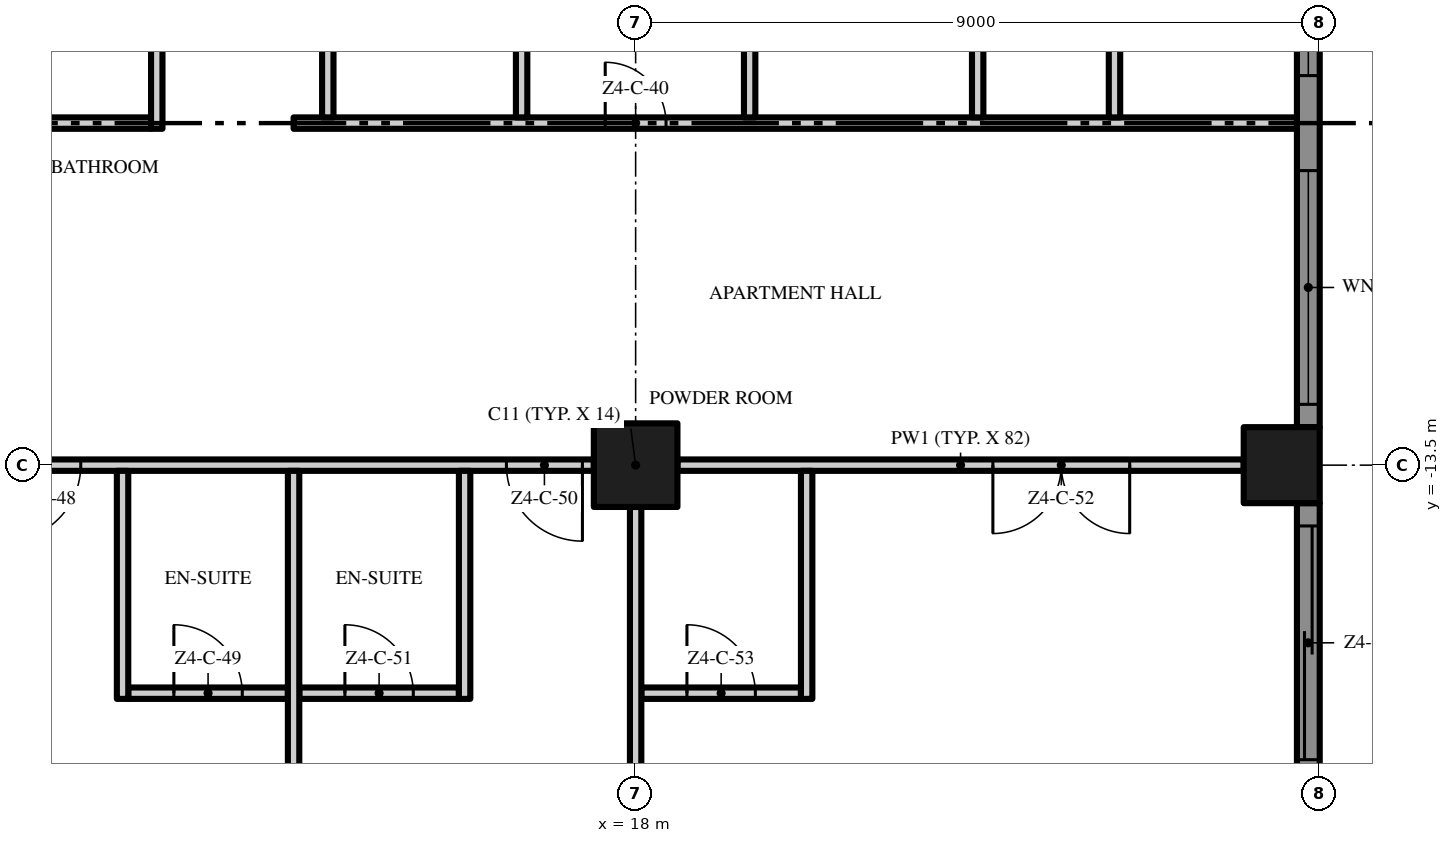
"""IFC4 building model, lengths in metres.
Left out: names, types, materials, properties, quantities, classifications, styles, units other than length and angle.
Written with IfcOpenShell. Run it as: python <this file> out.ifc"""

import sys

from ifc_helpers import new_model, si_unit, direction, frame, frame_2d, origin, origin_2d, place, context, subcontext, project, spatial, polyline, rectangle, outline, extrude, element, fill, save


model = new_model("IFC4")
c1 = context("Model", 3, precision=1e-05, world=origin(), true_north=direction((0.0, 1.0)))
c2 = subcontext(c1, "Body", "Model", "MODEL_VIEW")
j1 = project(units=[si_unit("LENGTHUNIT", "METRE"), si_unit("PLANEANGLEUNIT", "RADIAN")], contexts=[c1])
p1 = place(None, origin())
s1 = spatial("IfcSite", under=j1, at=p1, CompositionType="ELEMENT")
p2 = place(p1, origin())
s2 = spatial("IfcBuilding", under=s1, at=p2, CompositionType="ELEMENT")
p3 = place(p2, frame((0.0, 0.0, 211.0)))
s3 = spatial("IfcBuildingStorey", under=s2, at=p3, CompositionType="ELEMENT", Elevation=211.0)
p4 = place(p3, frame((18.0, -13.5, 0.0), z_axis=(0.0, 0.0, 1.0), x_axis=(1.0, 0.0, 0.0)))
e1 = element("IfcColumn", 1, at=p4, inside=s3, PredefinedType="COLUMN", context=c2, shape_type="SweptSolid", body=[
    extrude(rectangle(XDim=1.1, YDim=1.1, at=origin_2d()), origin(), (0.0, 0.0, 1.0), 3.5),
])
p5 = place(p3, frame((26.5, -13.5, 0.0), z_axis=(0.0, 0.0, 1.0), x_axis=(1.0, 0.0, 0.0)))
e2 = element("IfcColumn", 2, at=p5, inside=s3, PredefinedType="COLUMN", context=c2, shape_type="SweptSolid", body=[
    extrude(rectangle(XDim=1.0, YDim=1.0, at=origin_2d()), origin(), (0.0, 0.0, 1.0), 3.5),
])
p6 = place(p3, frame((26.85, -14.0, 0.0), z_axis=(0.0, 0.0, 1.0), x_axis=(0.0, -1.0, 0.0)))
e3 = element("IfcWall", 3, at=p6, inside=s3, PredefinedType="SOLIDWALL", context=c2, shape_type="SweptSolid", body=[
    extrude(rectangle(XDim=3.7, YDim=0.3, at=frame_2d((1.85, 0.0))), origin(), (0.0, 0.0, 1.0), 3.5),
])
p7 = place(p6, frame((0.3, 0.0, 0.0)))
e4 = element("IfcOpeningElement", 4, at=p7, cuts=e3, PredefinedType="OPENING", context=c2, shape_type="SweptSolid", body=[
    extrude(rectangle(XDim=3.075, YDim=2.4, at=frame_2d((1.538, 1.2))), frame((0.0, 0.16, 0.0), z_axis=(0.0, -1.0, 0.0), x_axis=(1.0, 0.0, 0.0)), (0.0, 0.0, 1.0), 0.32),
])
p8 = place(p3, frame((26.85, -5.0, 0.0), z_axis=(0.0, 0.0, 1.0), x_axis=(0.0, -1.0, 0.0)))
e5 = element("IfcWall", 5, at=p8, inside=s3, PredefinedType="SOLIDWALL", context=c2, shape_type="SweptSolid", body=[
    extrude(rectangle(XDim=8.0, YDim=0.3, at=frame_2d((4.0, 0.0))), origin(), (0.0, 0.0, 1.0), 3.5),
])
p9 = place(p8, frame((4.625, 0.0, 0.45)))
e6 = element("IfcOpeningElement", 6, at=p9, cuts=e5, PredefinedType="OPENING", context=c2, shape_type="SweptSolid", body=[
    extrude(rectangle(XDim=3.075, YDim=2.65, at=frame_2d((1.538, 1.325))), frame((0.0, 0.16, 0.0), z_axis=(0.0, -1.0, 0.0), x_axis=(1.0, 0.0, 0.0)), (0.0, 0.0, 1.0), 0.32),
])
p10 = place(p8, frame((0.3, 0.0, 0.45)))
e7 = element("IfcOpeningElement", 7, at=p10, cuts=e5, PredefinedType="OPENING", context=c2, shape_type="SweptSolid", body=[
    extrude(rectangle(XDim=3.075, YDim=2.65, at=frame_2d((1.538, 1.325))), frame((0.0, 0.16, 0.0), z_axis=(0.0, -1.0, 0.0), x_axis=(1.0, 0.0, 0.0)), (0.0, 0.0, 1.0), 0.32),
])
p11 = place(p3, origin())
e8 = element("IfcWall", 8, at=p11, inside=s3, PredefinedType="USERDEFINED", context=c2, shape_type="SweptSolid", body=[
    extrude(outline(polyline([(28.8, -18.0), (29.505, -16.5), (29.941, -15.0), (30.0, -14.25), (29.941, -13.5), (29.505, -12.0), (28.8, -10.5), (28.095, -9.0), (27.659, -7.5), (27.6, -6.75), (27.659, -6.0), (28.095, -4.5), (28.8, -3.0), (29.505, -1.5), (29.941, 0.0), (30.0, 0.75), (29.941, 1.5), (29.505, 3.0), (28.8, 4.5), (28.095, 6.0), (27.659, 7.5), (27.6, 8.25), (27.659, 9.0), (28.095, 10.5), (28.8, 12.0), (29.505, 13.5), (29.941, 15.0), (30.0, 15.75), (29.941, 16.5), (29.505, 18.0), (29.265, 17.93), (29.694, 16.455), (29.749, 15.75), (29.694, 15.045), (29.271, 13.589), (28.574, 12.106), (27.86, 10.589), (27.411, 9.045), (27.349, 8.25), (27.411, 7.455), (27.86, 5.911), (28.574, 4.394), (29.271, 2.911), (29.694, 1.455), (29.749, 0.75), (29.694, 0.045), (29.271, -1.411), (28.574, -2.894), (27.86, -4.411), (27.411, -5.955), (27.349, -6.75), (27.411, -7.545), (27.86, -9.089), (28.574, -10.606), (29.271, -12.089), (29.694, -13.545), (29.749, -14.25), (29.694, -14.955), (29.271, -16.411), (28.574, -17.894), (28.8, -18.0)])), origin(), (0.0, 0.0, 1.0), 0.9),
])
p12 = place(p3, frame((11.325, -16.5, 0.0), z_axis=(0.0, 0.0, 1.0), x_axis=(1.0, 0.0, 0.0)))
e9 = element("IfcWall", 9, at=p12, inside=s3, PredefinedType="PARTITIONING", context=c2, shape_type="SweptSolid", body=[
    extrude(rectangle(XDim=2.1, YDim=0.15, at=frame_2d((1.05, 0.0))), origin(), (0.0, 0.0, 1.0), 3.5),
])
p13 = place(p12, frame((0.6, 0.0, 0.0)))
e10 = element("IfcOpeningElement", 10, at=p13, cuts=e9, PredefinedType="OPENING", context=c2, shape_type="SweptSolid", body=[
    extrude(rectangle(XDim=0.9, YDim=2.1, at=frame_2d((0.45, 1.05))), frame((0.0, 0.085, 0.0), z_axis=(0.0, -1.0, 0.0), x_axis=(1.0, 0.0, 0.0)), (0.0, 0.0, 1.0), 0.17),
])
p14 = place(p3, frame((13.575, -16.5, 0.0), z_axis=(0.0, 0.0, 1.0), x_axis=(1.0, 0.0, 0.0)))
e11 = element("IfcWall", 11, at=p14, inside=s3, PredefinedType="PARTITIONING", context=c2, shape_type="SweptSolid", body=[
    extrude(rectangle(XDim=2.1, YDim=0.15, at=frame_2d((1.05, 0.0))), origin(), (0.0, 0.0, 1.0), 3.5),
])
p15 = place(p14, frame((0.6, 0.0, 0.0)))
e12 = element("IfcOpeningElement", 12, at=p15, cuts=e11, PredefinedType="OPENING", context=c2, shape_type="SweptSolid", body=[
    extrude(rectangle(XDim=0.9, YDim=2.1, at=frame_2d((0.45, 1.05))), frame((0.0, 0.085, 0.0), z_axis=(0.0, -1.0, 0.0), x_axis=(1.0, 0.0, 0.0)), (0.0, 0.0, 1.0), 0.17),
])
p16 = place(p3, frame((18.075, -16.5, 0.0), z_axis=(0.0, 0.0, 1.0), x_axis=(1.0, 0.0, 0.0)))
e13 = element("IfcWall", 13, at=p16, inside=s3, PredefinedType="PARTITIONING", context=c2, shape_type="SweptSolid", body=[
    extrude(rectangle(XDim=2.1, YDim=0.15, at=frame_2d((1.05, 0.0))), origin(), (0.0, 0.0, 1.0), 3.5),
])
p17 = place(p16, frame((0.6, 0.0, 0.0)))
e14 = element("IfcOpeningElement", 14, at=p17, cuts=e13, PredefinedType="OPENING", context=c2, shape_type="SweptSolid", body=[
    extrude(rectangle(XDim=0.9, YDim=2.1, at=frame_2d((0.45, 1.05))), frame((0.0, 0.085, 0.0), z_axis=(0.0, -1.0, 0.0), x_axis=(1.0, 0.0, 0.0)), (0.0, 0.0, 1.0), 0.17),
])
p18 = place(p3, frame((17.45, -13.5, 0.0), z_axis=(0.0, 0.0, 1.0), x_axis=(-1.0, 0.0, 0.0)))
e15 = element("IfcWall", 15, at=p18, inside=s3, PredefinedType="PARTITIONING", context=c2, shape_type="SweptSolid", body=[
    extrude(rectangle(XDim=7.9, YDim=0.15, at=frame_2d((3.95, 0.0))), origin(), (0.0, 0.0, 1.0), 3.5),
])
p19 = place(p18, frame((6.75, 0.0, 0.0)))
e16 = element("IfcOpeningElement", 16, at=p19, cuts=e15, PredefinedType="OPENING", context=c2, shape_type="SweptSolid", body=[
    extrude(rectangle(XDim=1.0, YDim=2.4, at=frame_2d((0.5, 1.2))), frame((0.0, 0.085, 0.0), z_axis=(0.0, -1.0, 0.0), x_axis=(1.0, 0.0, 0.0)), (0.0, 0.0, 1.0), 0.17),
])
p20 = place(p18, frame((0.15, 0.0, 0.0)))
e17 = element("IfcOpeningElement", 17, at=p20, cuts=e15, PredefinedType="OPENING", context=c2, shape_type="SweptSolid", body=[
    extrude(rectangle(XDim=1.0, YDim=2.4, at=frame_2d((0.5, 1.2))), frame((0.0, 0.085, 0.0), z_axis=(0.0, -1.0, 0.0), x_axis=(1.0, 0.0, 0.0)), (0.0, 0.0, 1.0), 0.17),
])
p21 = place(p3, frame((26.0, -13.5, 0.0), z_axis=(0.0, 0.0, 1.0), x_axis=(-1.0, 0.0, 0.0)))
e18 = element("IfcWall", 18, at=p21, inside=s3, PredefinedType="PARTITIONING", context=c2, shape_type="SweptSolid", body=[
    extrude(rectangle(XDim=7.45, YDim=0.15, at=frame_2d((3.725, 0.0))), origin(), (0.0, 0.0, 1.0), 3.5),
])
p22 = place(p21, frame((1.5, 0.0, 0.0)))
e19 = element("IfcOpeningElement", 19, at=p22, cuts=e18, PredefinedType="OPENING", context=c2, shape_type="SweptSolid", body=[
    extrude(rectangle(XDim=1.8, YDim=2.4, at=frame_2d((0.9, 1.2))), frame((0.0, 0.085, 0.0), z_axis=(0.0, -1.0, 0.0), x_axis=(1.0, 0.0, 0.0)), (0.0, 0.0, 1.0), 0.17),
])
p23 = place(p3, frame((0.1, -9.0, 0.0), z_axis=(0.0, 0.0, 1.0), x_axis=(1.0, 0.0, 0.0)))
e20 = element("IfcWall", 20, at=p23, inside=s3, PredefinedType="PARTITIONING", context=c2, shape_type="SweptSolid", body=[
    extrude(rectangle(XDim=11.525, YDim=0.15, at=frame_2d((5.763, 0.0))), origin(), (0.0, 0.0, 1.0), 3.5),
])
p24 = place(p23, frame((5.85, 0.0, 0.0)))
e21 = element("IfcOpeningElement", 21, at=p24, cuts=e20, PredefinedType="OPENING", context=c2, shape_type="SweptSolid", body=[
    extrude(rectangle(XDim=1.0, YDim=2.4, at=frame_2d((0.5, 1.2))), frame((0.0, 0.085, 0.0), z_axis=(0.0, -1.0, 0.0), x_axis=(1.0, 0.0, 0.0)), (0.0, 0.0, 1.0), 0.17),
])
p25 = place(p3, frame((13.5, -9.0, 0.0), z_axis=(0.0, 0.0, 1.0), x_axis=(1.0, 0.0, 0.0)))
e22 = element("IfcWall", 22, at=p25, inside=s3, PredefinedType="PARTITIONING", context=c2, shape_type="SweptSolid", body=[
    extrude(rectangle(XDim=13.2, YDim=0.15, at=frame_2d((6.6, 0.0))), origin(), (0.0, 0.0, 1.0), 3.5),
])
p26 = place(p25, frame((4.1, 0.0, 0.0)))
e23 = element("IfcOpeningElement", 23, at=p26, cuts=e22, PredefinedType="OPENING", context=c2, shape_type="SweptSolid", body=[
    extrude(rectangle(XDim=0.8, YDim=2.0, at=frame_2d((0.4, 1.0))), frame((0.0, 0.085, 0.0), z_axis=(0.0, -1.0, 0.0), x_axis=(1.0, 0.0, 0.0)), (0.0, 0.0, 1.0), 0.17),
])
p27 = place(p3, frame((11.25, -16.575, 0.0), z_axis=(0.0, 0.0, 1.0), x_axis=(0.0, 1.0, 0.0)))
e24 = element("IfcWall", 24, at=p27, inside=s3, PredefinedType="PARTITIONING", context=c2, shape_type="SweptSolid", body=[
    extrude(rectangle(XDim=3.0, YDim=0.15, at=frame_2d((1.5, 0.0))), origin(), (0.0, 0.0, 1.0), 3.5),
])
p28 = place(p3, frame((11.7, -9.075, 0.0), z_axis=(0.0, 0.0, 1.0), x_axis=(0.0, 1.0, 0.0)))
e25 = element("IfcWall", 25, at=p28, inside=s3, PredefinedType="PARTITIONING", context=c2, shape_type="SweptSolid", body=[
    extrude(rectangle(XDim=4.65, YDim=0.15, at=frame_2d((2.325, 0.0))), origin(), (0.0, 0.0, 1.0), 3.5),
])
p29 = place(p28, frame((1.875, 0.0, 0.0)))
e26 = element("IfcOpeningElement", 26, at=p29, cuts=e25, PredefinedType="OPENING", context=c2, shape_type="SweptSolid", body=[
    extrude(rectangle(XDim=0.9, YDim=2.1, at=frame_2d((0.45, 1.05))), frame((0.0, 0.085, 0.0), z_axis=(0.0, -1.0, 0.0), x_axis=(1.0, 0.0, 0.0)), (0.0, 0.0, 1.0), 0.17),
])
p30 = place(p3, frame((13.5, -22.2, 0.0), z_axis=(0.0, 0.0, 1.0), x_axis=(0.0, 1.0, 0.0)))
e27 = element("IfcWall", 27, at=p30, inside=s3, PredefinedType="PARTITIONING", context=c2, shape_type="SweptSolid", body=[
    extrude(rectangle(XDim=8.625, YDim=0.15, at=frame_2d((4.312, 0.0))), origin(), (0.0, 0.0, 1.0), 3.5),
])
p31 = place(p3, frame((13.95, -8.925, 0.0), z_axis=(0.0, 0.0, 1.0), x_axis=(0.0, 1.0, 0.0)))
e28 = element("IfcWall", 28, at=p31, inside=s3, PredefinedType="PARTITIONING", context=c2, shape_type="SweptSolid", body=[
    extrude(rectangle(XDim=4.5, YDim=0.15, at=frame_2d((2.25, 0.0))), origin(), (0.0, 0.0, 1.0), 3.5),
])
p32 = place(p3, frame((15.75, -16.575, 0.0), z_axis=(0.0, 0.0, 1.0), x_axis=(0.0, 1.0, 0.0)))
e29 = element("IfcWall", 29, at=p32, inside=s3, PredefinedType="PARTITIONING", context=c2, shape_type="SweptSolid", body=[
    extrude(rectangle(XDim=3.0, YDim=0.15, at=frame_2d((1.5, 0.0))), origin(), (0.0, 0.0, 1.0), 3.5),
])
p33 = place(p3, frame((16.5, -8.925, 0.0), z_axis=(0.0, 0.0, 1.0), x_axis=(0.0, 1.0, 0.0)))
e30 = element("IfcWall", 30, at=p33, inside=s3, PredefinedType="PARTITIONING", context=c2, shape_type="SweptSolid", body=[
    extrude(rectangle(XDim=4.35, YDim=0.15, at=frame_2d((2.175, 0.0))), origin(), (0.0, 0.0, 1.0), 3.5),
])
p34 = place(p3, frame((18.0, -21.5, 0.0), z_axis=(0.0, 0.0, 1.0), x_axis=(0.0, 1.0, 0.0)))
e31 = element("IfcWall", 31, at=p34, inside=s3, PredefinedType="PARTITIONING", context=c2, shape_type="SweptSolid", body=[
    extrude(rectangle(XDim=7.45, YDim=0.15, at=frame_2d((3.725, 0.0))), origin(), (0.0, 0.0, 1.0), 3.5),
])
p35 = place(p3, frame((19.5, -8.925, 0.0), z_axis=(0.0, 0.0, 1.0), x_axis=(0.0, 1.0, 0.0)))
e32 = element("IfcWall", 32, at=p35, inside=s3, PredefinedType="PARTITIONING", context=c2, shape_type="SweptSolid", body=[
    extrude(rectangle(XDim=4.35, YDim=0.15, at=frame_2d((2.175, 0.0))), origin(), (0.0, 0.0, 1.0), 3.5),
])
p36 = place(p3, frame((20.25, -16.575, 0.0), z_axis=(0.0, 0.0, 1.0), x_axis=(0.0, 1.0, 0.0)))
e33 = element("IfcWall", 33, at=p36, inside=s3, PredefinedType="PARTITIONING", context=c2, shape_type="SweptSolid", body=[
    extrude(rectangle(XDim=3.0, YDim=0.15, at=frame_2d((1.5, 0.0))), origin(), (0.0, 0.0, 1.0), 3.5),
])
for number, where, z_axis, x_axis in (
    (34, (22.5, -8.925, 0.0), (0.0, 0.0, 1.0), (0.0, 1.0, 0.0)),
    (35, (24.3, -8.925, 0.0), (0.0, 0.0, 1.0), (0.0, 1.0, 0.0)),
):
    element("IfcWall", number, at=place(p3, frame(where, z_axis=z_axis, x_axis=x_axis)), inside=s3, PredefinedType="PARTITIONING", context=c2, shape_type="SweptSolid", body=[
        extrude(rectangle(XDim=4.35, YDim=0.15, at=frame_2d((2.175, 0.0))), origin(), (0.0, 0.0, 1.0), 3.5),
    ])
p37 = place(p7, origin())
e36 = element("IfcDoor", 36, at=p37, inside=s3, OperationType="SINGLE_SWING_LEFT", PredefinedType="DOOR", context=c2, shape_type="SweptSolid", body=[
    extrude(rectangle(XDim=3.075, YDim=2.4, at=frame_2d((1.538, 1.2))), frame((0.0, 0.025, 0.0), z_axis=(0.0, -1.0, 0.0), x_axis=(1.0, 0.0, 0.0)), (0.0, 0.0, 1.0), 0.05),
])
fill(e4, e36)
p38 = place(p9, origin())
e37 = element("IfcWindow", 37, at=p38, inside=s3, PartitioningType="SINGLE_PANEL", PredefinedType="WINDOW", context=c2, shape_type="SweptSolid", body=[
    extrude(rectangle(XDim=3.075, YDim=2.65, at=frame_2d((1.538, 1.325))), frame((0.0, 0.03, 0.0), z_axis=(0.0, -1.0, 0.0), x_axis=(1.0, 0.0, 0.0)), (0.0, 0.0, 1.0), 0.06),
])
fill(e6, e37)
p39 = place(p10, origin())
e38 = element("IfcWindow", 38, at=p39, inside=s3, PartitioningType="SINGLE_PANEL", PredefinedType="WINDOW", context=c2, shape_type="SweptSolid", body=[
    extrude(rectangle(XDim=3.075, YDim=2.65, at=frame_2d((1.538, 1.325))), frame((0.0, 0.03, 0.0), z_axis=(0.0, -1.0, 0.0), x_axis=(1.0, 0.0, 0.0)), (0.0, 0.0, 1.0), 0.06),
])
fill(e7, e38)
p40 = place(p26, origin())
e39 = element("IfcDoor", 39, at=p40, inside=s3, OperationType="SINGLE_SWING_LEFT", PredefinedType="DOOR", context=c2, shape_type="SweptSolid", body=[
    extrude(rectangle(XDim=0.8, YDim=2.0, at=frame_2d((0.4, 1.0))), frame((0.0, 0.025, 0.0), z_axis=(0.0, -1.0, 0.0), x_axis=(1.0, 0.0, 0.0)), (0.0, 0.0, 1.0), 0.05),
])
fill(e23, e39)
p41 = place(p19, origin())
e40 = element("IfcDoor", 40, at=p41, inside=s3, OperationType="SINGLE_SWING_RIGHT", PredefinedType="DOOR", context=c2, shape_type="SweptSolid", body=[
    extrude(rectangle(XDim=1.0, YDim=2.4, at=frame_2d((0.5, 1.2))), frame((0.0, 0.025, 0.0), z_axis=(0.0, -1.0, 0.0), x_axis=(1.0, 0.0, 0.0)), (0.0, 0.0, 1.0), 0.05),
])
fill(e16, e40)
p42 = place(p13, origin())
e41 = element("IfcDoor", 41, at=p42, inside=s3, OperationType="SINGLE_SWING_LEFT", PredefinedType="DOOR", context=c2, shape_type="SweptSolid", body=[
    extrude(rectangle(XDim=0.9, YDim=2.1, at=frame_2d((0.45, 1.05))), frame((0.0, 0.025, 0.0), z_axis=(0.0, -1.0, 0.0), x_axis=(1.0, 0.0, 0.0)), (0.0, 0.0, 1.0), 0.05),
])
fill(e10, e41)
p43 = place(p20, origin())
e42 = element("IfcDoor", 42, at=p43, inside=s3, OperationType="SINGLE_SWING_LEFT", PredefinedType="DOOR", context=c2, shape_type="SweptSolid", body=[
    extrude(rectangle(XDim=1.0, YDim=2.4, at=frame_2d((0.5, 1.2))), frame((0.0, 0.025, 0.0), z_axis=(0.0, -1.0, 0.0), x_axis=(1.0, 0.0, 0.0)), (0.0, 0.0, 1.0), 0.05),
])
fill(e17, e42)
p44 = place(p15, origin())
e43 = element("IfcDoor", 43, at=p44, inside=s3, OperationType="SINGLE_SWING_LEFT", PredefinedType="DOOR", context=c2, shape_type="SweptSolid", body=[
    extrude(rectangle(XDim=0.9, YDim=2.1, at=frame_2d((0.45, 1.05))), frame((0.0, 0.025, 0.0), z_axis=(0.0, -1.0, 0.0), x_axis=(1.0, 0.0, 0.0)), (0.0, 0.0, 1.0), 0.05),
])
fill(e12, e43)
p45 = place(p22, origin())
e44 = element("IfcDoor", 44, at=p45, inside=s3, OperationType="DOUBLE_DOOR_SINGLE_SWING", PredefinedType="DOOR", context=c2, shape_type="SweptSolid", body=[
    extrude(rectangle(XDim=1.8, YDim=2.4, at=frame_2d((0.9, 1.2))), frame((0.0, 0.025, 0.0), z_axis=(0.0, -1.0, 0.0), x_axis=(1.0, 0.0, 0.0)), (0.0, 0.0, 1.0), 0.05),
])
fill(e19, e44)
p46 = place(p17, origin())
e45 = element("IfcDoor", 45, at=p46, inside=s3, OperationType="SINGLE_SWING_LEFT", PredefinedType="DOOR", context=c2, shape_type="SweptSolid", body=[
    extrude(rectangle(XDim=0.9, YDim=2.1, at=frame_2d((0.45, 1.05))), frame((0.0, 0.025, 0.0), z_axis=(0.0, -1.0, 0.0), x_axis=(1.0, 0.0, 0.0)), (0.0, 0.0, 1.0), 0.05),
])
fill(e14, e45)
save(model, sys.argv[1])
